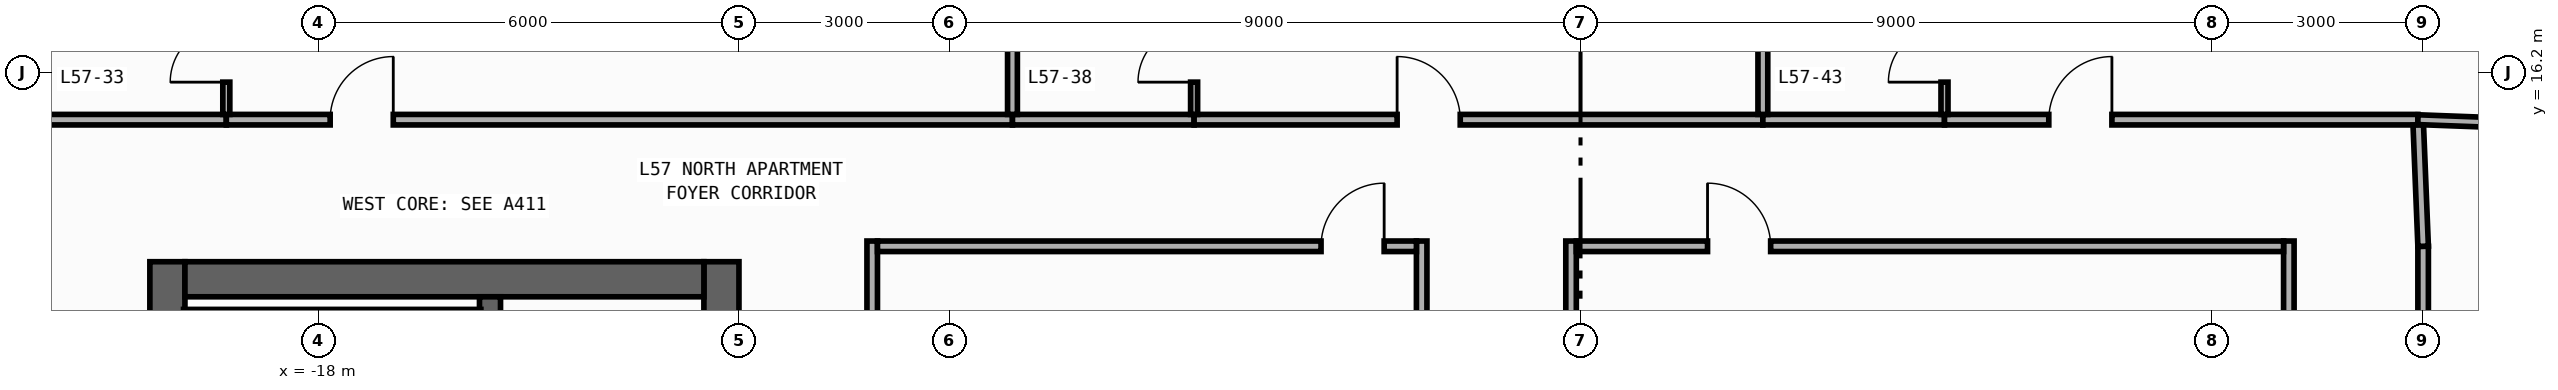
"""IFC4 building model, lengths in metres.
Left out: names, types, materials, properties, quantities, classifications, styles, units other than length and angle.
Written with IfcOpenShell. Run it as: python <this file> out.ifc"""

import sys

from ifc_helpers import new_model, si_unit, direction, frame, frame_2d, origin, place, context, subcontext, project, spatial, rectangle, extrude, element, fill, save


model = new_model("IFC4")
c1 = context("Model", 3, precision=1e-05, world=origin(), true_north=direction((0.0, 1.0)))
c2 = subcontext(c1, "Body", "Model", "MODEL_VIEW")
j1 = project(units=[si_unit("LENGTHUNIT", "METRE"), si_unit("PLANEANGLEUNIT", "RADIAN")], contexts=[c1])
p1 = place(None, origin())
s1 = spatial("IfcSite", under=j1, at=p1, CompositionType="ELEMENT")
p2 = place(p1, origin())
s2 = spatial("IfcBuilding", under=s1, at=p2, CompositionType="ELEMENT")
p3 = place(p2, frame((0.0, 0.0, 244.0)))
s3 = spatial("IfcBuildingStorey", under=s2, at=p3, CompositionType="ELEMENT", Elevation=244.0)
p4 = place(p3, frame((-20.15, -13.5, 0.0), z_axis=(0.0, 0.0, 1.0), x_axis=(0.0, 1.0, 0.0)))
e1 = element("IfcWall", 1, at=p4, inside=s3, PredefinedType="SHEAR", context=c2, shape_type="SweptSolid", body=[
    extrude(rectangle(XDim=27.0, YDim=0.5, at=frame_2d((13.5, 0.0))), origin(), (0.0, 0.0, 1.0), 3.34),
])
p5 = place(p3, frame((-12.25, -13.5, 0.0), z_axis=(0.0, 0.0, 1.0), x_axis=(0.0, 1.0, 0.0)))
e2 = element("IfcWall", 2, at=p5, inside=s3, PredefinedType="SHEAR", context=c2, shape_type="SweptSolid", body=[
    extrude(rectangle(XDim=27.0, YDim=0.5, at=frame_2d((13.5, 0.0))), origin(), (0.0, 0.0, 1.0), 3.34),
])
p6 = place(p5, frame((15.175, 0.0, 0.0)))
e3 = element("IfcOpeningElement", 3, at=p6, cuts=e2, PredefinedType="OPENING", context=c2, shape_type="SweptSolid", body=[
    extrude(rectangle(XDim=0.85, YDim=2.1, at=frame_2d((0.425, 1.05))), frame((0.0, 0.26, 0.0), z_axis=(0.0, -1.0, 0.0), x_axis=(1.0, 0.0, 0.0)), (0.0, 0.0, 1.0), 0.52),
])
p7 = place(p5, frame((21.275, 0.0, 0.0)))
e4 = element("IfcOpeningElement", 4, at=p7, cuts=e2, PredefinedType="OPENING", context=c2, shape_type="SweptSolid", body=[
    extrude(rectangle(XDim=0.85, YDim=2.1, at=frame_2d((0.425, 1.05))), frame((0.0, 0.26, 0.0), z_axis=(0.0, -1.0, 0.0), x_axis=(1.0, 0.0, 0.0)), (0.0, 0.0, 1.0), 0.52),
])
p8 = place(p5, frame((4.275, 0.0, 0.0)))
e5 = element("IfcOpeningElement", 5, at=p8, cuts=e2, PredefinedType="OPENING", context=c2, shape_type="SweptSolid", body=[
    extrude(rectangle(XDim=0.85, YDim=2.1, at=frame_2d((0.425, 1.05))), frame((0.0, 0.26, 0.0), z_axis=(0.0, -1.0, 0.0), x_axis=(1.0, 0.0, 0.0)), (0.0, 0.0, 1.0), 0.52),
])
p9 = place(p5, frame((10.275, 0.0, 0.0)))
e6 = element("IfcOpeningElement", 6, at=p9, cuts=e2, PredefinedType="OPENING", context=c2, shape_type="SweptSolid", body=[
    extrude(rectangle(XDim=0.85, YDim=2.1, at=frame_2d((0.425, 1.05))), frame((0.0, 0.26, 0.0), z_axis=(0.0, -1.0, 0.0), x_axis=(1.0, 0.0, 0.0)), (0.0, 0.0, 1.0), 0.52),
])
p10 = place(p5, frame((12.725, 0.0, 0.0)))
e7 = element("IfcOpeningElement", 7, at=p10, cuts=e2, PredefinedType="OPENING", context=c2, shape_type="SweptSolid", body=[
    extrude(rectangle(XDim=1.15, YDim=2.2, at=frame_2d((0.575, 1.1))), frame((0.0, 0.26, 0.0), z_axis=(0.0, -1.0, 0.0), x_axis=(1.0, 0.0, 0.0)), (0.0, 0.0, 1.0), 0.52),
])
p11 = place(p5, frame((1.625, 0.0, 0.0)))
e8 = element("IfcOpeningElement", 8, at=p11, cuts=e2, PredefinedType="OPENING", context=c2, shape_type="SweptSolid", body=[
    extrude(rectangle(XDim=0.85, YDim=2.1, at=frame_2d((0.425, 1.05))), frame((0.0, 0.26, 0.0), z_axis=(0.0, -1.0, 0.0), x_axis=(1.0, 0.0, 0.0)), (0.0, 0.0, 1.0), 0.52),
])
p12 = place(p3, frame((-19.9, 13.25, 0.0), z_axis=(0.0, 0.0, 1.0), x_axis=(1.0, 0.0, 0.0)))
e9 = element("IfcWall", 9, at=p12, inside=s3, PredefinedType="SHEAR", context=c2, shape_type="SweptSolid", body=[
    extrude(rectangle(XDim=7.4, YDim=0.5, at=frame_2d((3.7, 0.0))), origin(), (0.0, 0.0, 1.0), 3.34),
])
p13 = place(p3, frame((-15.55, -13.0, 0.0), z_axis=(0.0, 0.0, 1.0), x_axis=(0.0, 1.0, 0.0)))
e10 = element("IfcWall", 10, at=p13, inside=s3, PredefinedType="SHEAR", context=c2, shape_type="SweptSolid", body=[
    extrude(rectangle(XDim=26.0, YDim=0.3, at=frame_2d((13.0, 0.0))), origin(), (0.0, 0.0, 1.0), 3.34),
])
p14 = place(p13, frame((12.225, 0.0, 0.0)))
e11 = element("IfcOpeningElement", 11, at=p14, cuts=e10, PredefinedType="OPENING", context=c2, shape_type="SweptSolid", body=[
    extrude(rectangle(XDim=1.15, YDim=2.2, at=frame_2d((0.575, 1.1))), frame((0.0, 0.16, 0.0), z_axis=(0.0, -1.0, 0.0), x_axis=(1.0, 0.0, 0.0)), (0.0, 0.0, 1.0), 0.32),
])
p15 = place(p13, frame((1.125, 0.0, 0.0)))
e12 = element("IfcOpeningElement", 12, at=p15, cuts=e10, PredefinedType="OPENING", context=c2, shape_type="SweptSolid", body=[
    extrude(rectangle(XDim=0.85, YDim=2.1, at=frame_2d((0.425, 1.05))), frame((0.0, 0.16, 0.0), z_axis=(0.0, -1.0, 0.0), x_axis=(1.0, 0.0, 0.0)), (0.0, 0.0, 1.0), 0.32),
])
p16 = place(p3, frame((-19.92, 12.71, 0.0), z_axis=(0.0, 0.0, 1.0), x_axis=(1.0, 0.0, 0.0)))
e13 = element("IfcWall", 13, at=p16, inside=s3, PredefinedType="SHEAR", context=c2, shape_type="SweptSolid", body=[
    extrude(rectangle(XDim=4.24, YDim=0.22, at=frame_2d((2.12, 0.0))), origin(), (0.0, 0.0, 1.0), 3.34),
])
p17 = place(p3, frame((-10.1, -0.61, 0.0), z_axis=(0.0, 0.0, 1.0), x_axis=(0.0, 1.0, 0.0)))
e14 = element("IfcWall", 14, at=p17, inside=s3, PredefinedType="PARTITIONING", context=c2, shape_type="SweptSolid", body=[
    extrude(rectangle(XDim=14.405, YDim=0.15, at=frame_2d((7.203, 0.0))), origin(), (0.0, 0.0, 1.0), 3.34),
])
p18 = place(p17, frame((5.535, 0.0, 0.0)))
e15 = element("IfcOpeningElement", 15, at=p18, cuts=e14, PredefinedType="OPENING", context=c2, shape_type="SweptSolid", body=[
    extrude(rectangle(XDim=0.9, YDim=2.15, at=frame_2d((0.45, 1.075))), frame((0.0, 0.085, 0.0), z_axis=(0.0, -1.0, 0.0), x_axis=(1.0, 0.0, 0.0)), (0.0, 0.0, 1.0), 0.17),
])
p19 = place(p3, frame((12.015, 7.2, 0.0), z_axis=(0.0, 0.0, 1.0), x_axis=(0.0, 1.0, 0.0)))
e16 = element("IfcWall", 16, at=p19, inside=s3, PredefinedType="PARTITIONING", context=c2, shape_type="SweptSolid", body=[
    extrude(rectangle(XDim=6.52, YDim=0.15, at=frame_2d((3.26, 0.0))), origin(), (0.0, 0.0, 1.0), 3.34),
])
p20 = place(p19, frame((0.67, 0.0, 0.0)))
e17 = element("IfcOpeningElement", 17, at=p20, cuts=e16, PredefinedType="OPENING", context=c2, shape_type="SweptSolid", body=[
    extrude(rectangle(XDim=0.9, YDim=2.15, at=frame_2d((0.45, 1.075))), frame((0.0, 0.085, 0.0), z_axis=(0.0, -1.0, 0.0), x_axis=(1.0, 0.0, 0.0)), (0.0, 0.0, 1.0), 0.17),
])
p21 = place(p3, frame((10.1, -0.61, 0.0), z_axis=(0.0, 0.0, 1.0), x_axis=(0.0, 1.0, 0.0)))
e18 = element("IfcWall", 18, at=p21, inside=s3, PredefinedType="PARTITIONING", context=c2, shape_type="SweptSolid", body=[
    extrude(rectangle(XDim=14.405, YDim=0.15, at=frame_2d((7.203, 0.0))), origin(), (0.0, 0.0, 1.0), 3.34),
])
p22 = place(p21, frame((5.535, 0.0, 0.0)))
e19 = element("IfcOpeningElement", 19, at=p22, cuts=e18, PredefinedType="OPENING", context=c2, shape_type="SweptSolid", body=[
    extrude(rectangle(XDim=0.9, YDim=2.15, at=frame_2d((0.45, 1.075))), frame((0.0, 0.085, 0.0), z_axis=(0.0, -1.0, 0.0), x_axis=(1.0, 0.0, 0.0)), (0.0, 0.0, 1.0), 0.17),
])
p23 = place(p3, frame((-2.265, -0.46, 0.0), z_axis=(0.0, 0.0, 1.0), x_axis=(0.0, 1.0, 0.0)))
e20 = element("IfcWall", 20, at=p23, inside=s3, PredefinedType="PARTITIONING", context=c2, shape_type="SweptSolid", body=[
    extrude(rectangle(XDim=14.255, YDim=0.15, at=frame_2d((7.127, 0.0))), origin(), (0.0, 0.0, 1.0), 3.34),
])
p24 = place(p23, frame((5.474, 0.0, 0.0)))
e21 = element("IfcOpeningElement", 21, at=p24, cuts=e20, PredefinedType="OPENING", context=c2, shape_type="SweptSolid", body=[
    extrude(rectangle(XDim=0.9, YDim=2.15, at=frame_2d((0.45, 1.075))), frame((0.0, 0.085, 0.0), z_axis=(0.0, -1.0, 0.0), x_axis=(1.0, 0.0, 0.0)), (0.0, 0.0, 1.0), 0.17),
])
p25 = place(p3, frame((-0.135, -0.46, 0.0), z_axis=(0.0, 0.0, 1.0), x_axis=(0.0, 1.0, 0.0)))
e22 = element("IfcWall", 22, at=p25, inside=s3, PredefinedType="PARTITIONING", context=c2, shape_type="SweptSolid", body=[
    extrude(rectangle(XDim=14.255, YDim=0.15, at=frame_2d((7.127, 0.0))), origin(), (0.0, 0.0, 1.0), 3.34),
])
p26 = place(p25, frame((5.474, 0.0, 0.0)))
e23 = element("IfcOpeningElement", 23, at=p26, cuts=e22, PredefinedType="OPENING", context=c2, shape_type="SweptSolid", body=[
    extrude(rectangle(XDim=0.9, YDim=2.15, at=frame_2d((0.45, 1.075))), frame((0.0, 0.085, 0.0), z_axis=(0.0, -1.0, 0.0), x_axis=(1.0, 0.0, 0.0)), (0.0, 0.0, 1.0), 0.17),
])
p27 = place(p3, frame((-21.955, 15.525, 0.0), z_axis=(0.0, 0.0, 1.0), x_axis=(1.0, 0.0, 0.0)))
e24 = element("IfcWall", 24, at=p27, inside=s3, PredefinedType="PARTITIONING", context=c2, shape_type="SweptSolid", body=[
    extrude(rectangle(XDim=2.645, YDim=0.15, at=frame_2d((1.323, 0.0))), origin(), (0.0, 0.0, 1.0), 3.34),
])
p28 = place(p3, frame((-19.31, 15.525, 0.0), z_axis=(0.0, 0.0, 1.0), x_axis=(1.0, 0.0, 0.0)))
e25 = element("IfcWall", 25, at=p28, inside=s3, PredefinedType="PARTITIONING", context=c2, shape_type="SweptSolid", body=[
    extrude(rectangle(XDim=11.21, YDim=0.15, at=frame_2d((5.605, 0.0))), origin(), (0.0, 0.0, 1.0), 3.34),
])
p29 = place(p28, frame((1.481, 0.0, 0.0)))
e26 = element("IfcOpeningElement", 26, at=p29, cuts=e25, PredefinedType="OPENING", context=c2, shape_type="SweptSolid", body=[
    extrude(rectangle(XDim=0.9, YDim=2.15, at=frame_2d((0.45, 1.075))), frame((0.0, 0.085, 0.0), z_axis=(0.0, -1.0, 0.0), x_axis=(1.0, 0.0, 0.0)), (0.0, 0.0, 1.0), 0.17),
])
p30 = place(p3, frame((-8.1, 15.525, 0.0), z_axis=(0.0, 0.0, 1.0), x_axis=(1.0, 0.0, 0.0)))
e27 = element("IfcWall", 27, at=p30, inside=s3, PredefinedType="PARTITIONING", context=c2, shape_type="SweptSolid", body=[
    extrude(rectangle(XDim=2.59, YDim=0.15, at=frame_2d((1.295, 0.0))), origin(), (0.0, 0.0, 1.0), 3.34),
])
p31 = place(p3, frame((-5.51, 15.525, 0.0), z_axis=(0.0, 0.0, 1.0), x_axis=(1.0, 0.0, 0.0)))
e28 = element("IfcWall", 28, at=p31, inside=s3, PredefinedType="PARTITIONING", context=c2, shape_type="SweptSolid", body=[
    extrude(rectangle(XDim=8.11, YDim=0.15, at=frame_2d((4.055, 0.0))), origin(), (0.0, 0.0, 1.0), 3.34),
])
p32 = place(p31, frame((2.895, 0.0, 0.0)))
e29 = element("IfcOpeningElement", 29, at=p32, cuts=e28, PredefinedType="OPENING", context=c2, shape_type="SweptSolid", body=[
    extrude(rectangle(XDim=0.9, YDim=2.15, at=frame_2d((0.45, 1.075))), frame((0.0, 0.085, 0.0), z_axis=(0.0, -1.0, 0.0), x_axis=(1.0, 0.0, 0.0)), (0.0, 0.0, 1.0), 0.17),
])
p33 = place(p3, frame((2.6, 15.525, 0.0), z_axis=(0.0, 0.0, 1.0), x_axis=(1.0, 0.0, 0.0)))
e30 = element("IfcWall", 30, at=p33, inside=s3, PredefinedType="PARTITIONING", context=c2, shape_type="SweptSolid", body=[
    extrude(rectangle(XDim=2.59, YDim=0.15, at=frame_2d((1.295, 0.0))), origin(), (0.0, 0.0, 1.0), 3.34),
])
p34 = place(p3, frame((5.19, 15.525, 0.0), z_axis=(0.0, 0.0, 1.0), x_axis=(1.0, 0.0, 0.0)))
e31 = element("IfcWall", 31, at=p34, inside=s3, PredefinedType="PARTITIONING", context=c2, shape_type="SweptSolid", body=[
    extrude(rectangle(XDim=6.75, YDim=0.15, at=frame_2d((3.375, 0.0))), origin(), (0.0, 0.0, 1.0), 3.34),
])
p35 = place(p34, frame((1.487, 0.0, 0.0)))
e32 = element("IfcOpeningElement", 32, at=p35, cuts=e31, PredefinedType="OPENING", context=c2, shape_type="SweptSolid", body=[
    extrude(rectangle(XDim=0.9, YDim=2.15, at=frame_2d((0.45, 1.075))), frame((0.0, 0.085, 0.0), z_axis=(0.0, -1.0, 0.0), x_axis=(1.0, 0.0, 0.0)), (0.0, 0.0, 1.0), 0.17),
])
p36 = place(p3, frame((12.015, 13.72, 0.0), z_axis=(0.0, 0.0, 1.0), x_axis=(-0.040046877756, 0.99919780203, 0.0)))
e33 = element("IfcWall", 33, at=p36, inside=s3, PredefinedType="PARTITIONING", context=c2, shape_type="SweptSolid", body=[
    extrude(rectangle(XDim=1.731, YDim=0.15, at=frame_2d((0.866, 0.0))), origin(), (0.0, 0.0, 1.0), 3.34),
])
p37 = place(p3, frame((-10.025, 13.72, 0.0), z_axis=(0.0, 0.0, 1.0), x_axis=(1.0, 0.0, 0.0)))
e34 = element("IfcWall", 34, at=p37, inside=s3, PredefinedType="PARTITIONING", context=c2, shape_type="SweptSolid", body=[
    extrude(rectangle(XDim=7.685, YDim=0.15, at=frame_2d((3.842, 0.0))), origin(), (0.0, 0.0, 1.0), 3.34),
])
p38 = place(p37, frame((6.325, 0.0, 0.0)))
e35 = element("IfcOpeningElement", 35, at=p38, cuts=e34, PredefinedType="OPENING", context=c2, shape_type="SweptSolid", body=[
    extrude(rectangle(XDim=0.9, YDim=2.15, at=frame_2d((0.45, 1.075))), frame((0.0, 0.085, 0.0), z_axis=(0.0, -1.0, 0.0), x_axis=(1.0, 0.0, 0.0)), (0.0, 0.0, 1.0), 0.17),
])
p39 = place(p3, frame((-0.06, 13.72, 0.0), z_axis=(0.0, 0.0, 1.0), x_axis=(1.0, 0.0, 0.0)))
e36 = element("IfcWall", 36, at=p39, inside=s3, PredefinedType="PARTITIONING", context=c2, shape_type="SweptSolid", body=[
    extrude(rectangle(XDim=10.085, YDim=0.15, at=frame_2d((5.042, 0.0))), origin(), (0.0, 0.0, 1.0), 3.34),
])
p40 = place(p39, frame((1.871, 0.0, 0.0)))
e37 = element("IfcOpeningElement", 37, at=p40, cuts=e36, PredefinedType="OPENING", context=c2, shape_type="SweptSolid", body=[
    extrude(rectangle(XDim=0.9, YDim=2.15, at=frame_2d((0.45, 1.075))), frame((0.0, 0.085, 0.0), z_axis=(0.0, -1.0, 0.0), x_axis=(1.0, 0.0, 0.0)), (0.0, 0.0, 1.0), 0.17),
])
p41 = place(p3, frame((-19.31, 15.6, 0.0), z_axis=(0.0, 0.0, 1.0), x_axis=(0.0, 1.0, 0.0)))
e38 = element("IfcWall", 38, at=p41, inside=s3, PredefinedType="PARTITIONING", context=c2, shape_type="SweptSolid", body=[
    extrude(rectangle(XDim=2.5, YDim=0.1, at=frame_2d((1.25, 0.0))), origin(), (0.0, 0.0, 1.0), 3.34),
])
p42 = place(p41, frame((0.46, 0.0, 0.0)))
e39 = element("IfcOpeningElement", 39, at=p42, cuts=e38, PredefinedType="OPENING", context=c2, shape_type="SweptSolid", body=[
    extrude(rectangle(XDim=0.8, YDim=2.1, at=frame_2d((0.4, 1.05))), frame((0.0, 0.06, 0.0), z_axis=(0.0, -1.0, 0.0), x_axis=(1.0, 0.0, 0.0)), (0.0, 0.0, 1.0), 0.12),
])
p43 = place(p3, frame((-8.1, 15.6, 0.0), z_axis=(0.0, 0.0, 1.0), x_axis=(0.0, 1.0, 0.0)))
e40 = element("IfcWall", 40, at=p43, inside=s3, PredefinedType="PARTITIONING", context=c2, shape_type="SweptSolid", body=[
    extrude(rectangle(XDim=2.5, YDim=0.14, at=frame_2d((1.25, 0.0))), origin(), (0.0, 0.0, 1.0), 3.34),
])
p44 = place(p3, frame((-5.51, 15.6, 0.0), z_axis=(0.0, 0.0, 1.0), x_axis=(0.0, 1.0, 0.0)))
e41 = element("IfcWall", 41, at=p44, inside=s3, PredefinedType="PARTITIONING", context=c2, shape_type="SweptSolid", body=[
    extrude(rectangle(XDim=2.5, YDim=0.1, at=frame_2d((1.25, 0.0))), origin(), (0.0, 0.0, 1.0), 3.34),
])
p45 = place(p44, frame((0.46, 0.0, 0.0)))
e42 = element("IfcOpeningElement", 42, at=p45, cuts=e41, PredefinedType="OPENING", context=c2, shape_type="SweptSolid", body=[
    extrude(rectangle(XDim=0.8, YDim=2.1, at=frame_2d((0.4, 1.05))), frame((0.0, 0.06, 0.0), z_axis=(0.0, -1.0, 0.0), x_axis=(1.0, 0.0, 0.0)), (0.0, 0.0, 1.0), 0.12),
])
p46 = place(p3, frame((2.6, 15.6, 0.0), z_axis=(0.0, 0.0, 1.0), x_axis=(0.0, 1.0, 0.0)))
e43 = element("IfcWall", 43, at=p46, inside=s3, PredefinedType="PARTITIONING", context=c2, shape_type="SweptSolid", body=[
    extrude(rectangle(XDim=2.5, YDim=0.14, at=frame_2d((1.25, 0.0))), origin(), (0.0, 0.0, 1.0), 3.34),
])
p47 = place(p3, frame((5.19, 15.6, 0.0), z_axis=(0.0, 0.0, 1.0), x_axis=(0.0, 1.0, 0.0)))
e44 = element("IfcWall", 44, at=p47, inside=s3, PredefinedType="PARTITIONING", context=c2, shape_type="SweptSolid", body=[
    extrude(rectangle(XDim=2.5, YDim=0.1, at=frame_2d((1.25, 0.0))), origin(), (0.0, 0.0, 1.0), 3.34),
])
p48 = place(p47, frame((0.46, 0.0, 0.0)))
e45 = element("IfcOpeningElement", 45, at=p48, cuts=e44, PredefinedType="OPENING", context=c2, shape_type="SweptSolid", body=[
    extrude(rectangle(XDim=0.8, YDim=2.1, at=frame_2d((0.4, 1.05))), frame((0.0, 0.06, 0.0), z_axis=(0.0, -1.0, 0.0), x_axis=(1.0, 0.0, 0.0)), (0.0, 0.0, 1.0), 0.12),
])
p49 = place(p3, frame((11.94, 15.525, 0.0), z_axis=(0.0, 0.0, 1.0), x_axis=(0.999304229002, -0.037296888581, 0.0)))
e46 = element("IfcWall", 46, at=p49, inside=s3, PredefinedType="PARTITIONING", context=c2, shape_type="SweptSolid", body=[
    extrude(rectangle(XDim=1.741, YDim=0.14, at=frame_2d((0.871, 0.0))), origin(), (0.0, 0.0, 1.0), 3.34),
])
p50 = place(p29, origin())
e47 = element("IfcDoor", 47, at=p50, inside=s3, OperationType="SINGLE_SWING_RIGHT", PredefinedType="DOOR", context=c2, shape_type="SweptSolid", body=[
    extrude(rectangle(XDim=0.9, YDim=2.15, at=frame_2d((0.45, 1.075))), frame((0.0, 0.025, 0.0), z_axis=(0.0, -1.0, 0.0), x_axis=(1.0, 0.0, 0.0)), (0.0, 0.0, 1.0), 0.05),
])
fill(e26, e47)
p51 = place(p32, origin())
e48 = element("IfcDoor", 48, at=p51, inside=s3, OperationType="SINGLE_SWING_LEFT", PredefinedType="DOOR", context=c2, shape_type="SweptSolid", body=[
    extrude(rectangle(XDim=0.9, YDim=2.15, at=frame_2d((0.45, 1.075))), frame((0.0, 0.025, 0.0), z_axis=(0.0, -1.0, 0.0), x_axis=(1.0, 0.0, 0.0)), (0.0, 0.0, 1.0), 0.05),
])
fill(e29, e48)
p52 = place(p35, origin())
e49 = element("IfcDoor", 49, at=p52, inside=s3, OperationType="SINGLE_SWING_RIGHT", PredefinedType="DOOR", context=c2, shape_type="SweptSolid", body=[
    extrude(rectangle(XDim=0.9, YDim=2.15, at=frame_2d((0.45, 1.075))), frame((0.0, 0.025, 0.0), z_axis=(0.0, -1.0, 0.0), x_axis=(1.0, 0.0, 0.0)), (0.0, 0.0, 1.0), 0.05),
])
fill(e32, e49)
p53 = place(p38, origin())
e50 = element("IfcDoor", 50, at=p53, inside=s3, OperationType="SINGLE_SWING_RIGHT", PredefinedType="DOOR", context=c2, shape_type="SweptSolid", body=[
    extrude(rectangle(XDim=0.9, YDim=2.15, at=frame_2d((0.45, 1.075))), frame((0.0, 0.025, 0.0), z_axis=(0.0, -1.0, 0.0), x_axis=(1.0, 0.0, 0.0)), (0.0, 0.0, 1.0), 0.05),
])
fill(e35, e50)
p54 = place(p40, origin())
e51 = element("IfcDoor", 51, at=p54, inside=s3, OperationType="SINGLE_SWING_LEFT", PredefinedType="DOOR", context=c2, shape_type="SweptSolid", body=[
    extrude(rectangle(XDim=0.9, YDim=2.15, at=frame_2d((0.45, 1.075))), frame((0.0, 0.025, 0.0), z_axis=(0.0, -1.0, 0.0), x_axis=(1.0, 0.0, 0.0)), (0.0, 0.0, 1.0), 0.05),
])
fill(e37, e51)
p55 = place(p42, origin())
e52 = element("IfcDoor", 52, at=p55, inside=s3, OperationType="SINGLE_SWING_LEFT", PredefinedType="DOOR", context=c2, shape_type="SweptSolid", body=[
    extrude(rectangle(XDim=0.8, YDim=2.1, at=frame_2d((0.4, 1.05))), frame((0.0, 0.025, 0.0), z_axis=(0.0, -1.0, 0.0), x_axis=(1.0, 0.0, 0.0)), (0.0, 0.0, 1.0), 0.05),
])
fill(e39, e52)
p56 = place(p45, origin())
e53 = element("IfcDoor", 53, at=p56, inside=s3, OperationType="SINGLE_SWING_LEFT", PredefinedType="DOOR", context=c2, shape_type="SweptSolid", body=[
    extrude(rectangle(XDim=0.8, YDim=2.1, at=frame_2d((0.4, 1.05))), frame((0.0, 0.025, 0.0), z_axis=(0.0, -1.0, 0.0), x_axis=(1.0, 0.0, 0.0)), (0.0, 0.0, 1.0), 0.05),
])
fill(e42, e53)
p57 = place(p48, origin())
e54 = element("IfcDoor", 54, at=p57, inside=s3, OperationType="SINGLE_SWING_LEFT", PredefinedType="DOOR", context=c2, shape_type="SweptSolid", body=[
    extrude(rectangle(XDim=0.8, YDim=2.1, at=frame_2d((0.4, 1.05))), frame((0.0, 0.025, 0.0), z_axis=(0.0, -1.0, 0.0), x_axis=(1.0, 0.0, 0.0)), (0.0, 0.0, 1.0), 0.05),
])
fill(e45, e54)
save(model, sys.argv[1])
